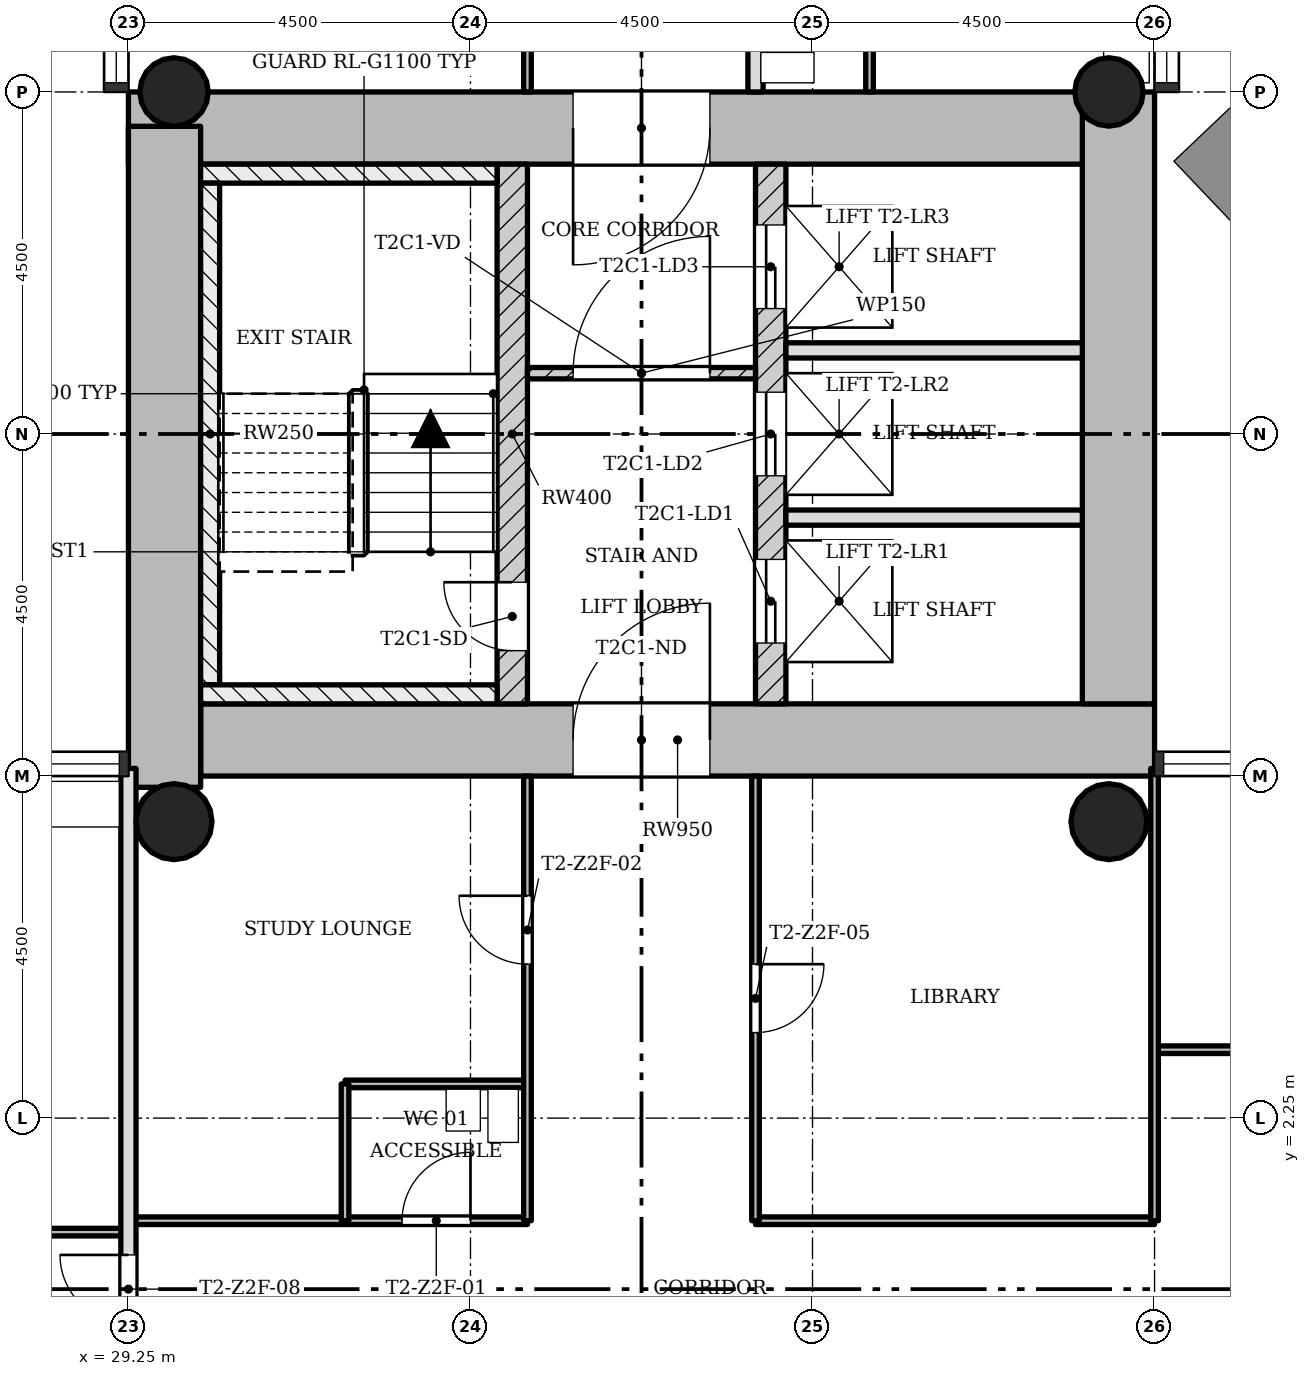
"""IFC4 building model, lengths in metres.
Left out: names, types, materials, properties, quantities, classifications, styles, units other than length and angle.
Written with IfcOpenShell. Run it as: python <this file> out.ifc"""

import sys

from ifc_helpers import new_model, si_unit, direction, frame, frame_2d, origin, origin_2d, place, context, subcontext, project, spatial, rectangle, hollow_circle, extrude, element, fill, save


model = new_model("IFC4")
c1 = context("Model", 3, precision=1e-05, world=origin(), true_north=direction((0.0, 1.0)))
c2 = subcontext(c1, "Body", "Model", "MODEL_VIEW")
j1 = project(units=[si_unit("LENGTHUNIT", "METRE"), si_unit("PLANEANGLEUNIT", "RADIAN")], contexts=[c1])
p1 = place(None, origin())
s1 = spatial("IfcSite", under=j1, at=p1, CompositionType="ELEMENT")
p2 = place(p1, origin())
s2 = spatial("IfcBuilding", under=s1, at=p2, CompositionType="ELEMENT")
p3 = place(p2, frame((0.0, 0.0, 114.0)))
s3 = spatial("IfcBuildingStorey", under=s2, at=p3, CompositionType="ELEMENT", Elevation=114.0)
p4 = place(p3, frame((30.2, 7.225, 0.0), z_axis=(0.0, 0.0, 1.0), x_axis=(1.0, 0.0, 0.0)))
e1 = element("IfcWall", 1, at=p4, inside=s3, PredefinedType="SHEAR", context=c2, shape_type="SweptSolid", body=[
    extrude(rectangle(XDim=12.55, YDim=0.95, at=frame_2d((6.275, 0.0))), origin(), (0.0, 0.0, 1.0), 3.4),
])
p5 = place(p4, frame((4.9, 0.0, 0.0)))
e2 = element("IfcOpeningElement", 2, at=p5, cuts=e1, PredefinedType="OPENING", context=c2, shape_type="SweptSolid", body=[
    extrude(rectangle(XDim=1.8, YDim=2.1, at=frame_2d((0.9, 1.05))), frame((0.0, 0.485, 0.0), z_axis=(0.0, -1.0, 0.0), x_axis=(1.0, 0.0, 0.0)), (0.0, 0.0, 1.0), 0.97),
])
p6 = place(p3, frame((42.275, 7.7, 0.0), z_axis=(0.0, 0.0, 1.0), x_axis=(0.0, 1.0, 0.0)))
e3 = element("IfcWall", 3, at=p6, inside=s3, PredefinedType="SHEAR", context=c2, shape_type="SweptSolid", body=[
    extrude(rectangle(XDim=8.05, YDim=0.95, at=frame_2d((4.025, 0.0))), origin(), (0.0, 0.0, 1.0), 3.4),
])
p7 = place(p3, frame((41.8, 15.275, 0.0), z_axis=(0.0, 0.0, 1.0), x_axis=(-1.0, 0.0, 0.0)))
e4 = element("IfcWall", 4, at=p7, inside=s3, PredefinedType="SHEAR", context=c2, shape_type="SweptSolid", body=[
    extrude(rectangle(XDim=12.55, YDim=0.95, at=frame_2d((6.275, 0.0))), origin(), (0.0, 0.0, 1.0), 3.4),
])
p8 = place(p7, frame((4.9, 0.0, 0.0)))
e5 = element("IfcOpeningElement", 5, at=p8, cuts=e4, PredefinedType="OPENING", context=c2, shape_type="SweptSolid", body=[
    extrude(rectangle(XDim=1.8, YDim=2.1, at=frame_2d((0.9, 1.05))), frame((0.0, 0.485, 0.0), z_axis=(0.0, -1.0, 0.0), x_axis=(1.0, 0.0, 0.0)), (0.0, 0.0, 1.0), 0.97),
])
p9 = place(p3, frame((29.725, 15.298, 0.0), z_axis=(0.0, 0.0, 1.0), x_axis=(0.0, -1.0, 0.0)))
e6 = element("IfcWall", 6, at=p9, inside=s3, PredefinedType="SHEAR", context=c2, shape_type="SweptSolid", body=[
    extrude(rectangle(XDim=8.696, YDim=0.95, at=frame_2d((4.348, 0.0))), origin(), (0.0, 0.0, 1.0), 3.4),
])
p10 = place(p3, frame((34.3, 7.7, 0.0), z_axis=(0.0, 0.0, 1.0), x_axis=(0.0, 1.0, 0.0)))
e7 = element("IfcWall", 7, at=p10, inside=s3, PredefinedType="SHEAR", context=c2, shape_type="SweptSolid", body=[
    extrude(rectangle(XDim=7.1, YDim=0.4, at=frame_2d((3.55, 0.0))), origin(), (0.0, 0.0, 1.0), 3.4),
])
p11 = place(p10, frame((0.7, 0.0, 0.0)))
e8 = element("IfcOpeningElement", 8, at=p11, cuts=e7, PredefinedType="OPENING", context=c2, shape_type="SweptSolid", body=[
    extrude(rectangle(XDim=0.9, YDim=2.1, at=frame_2d((0.45, 1.05))), frame((0.0, 0.21, 0.0), z_axis=(0.0, -1.0, 0.0), x_axis=(1.0, 0.0, 0.0)), (0.0, 0.0, 1.0), 0.42),
])
p12 = place(p3, frame((37.7, 7.7, 0.0), z_axis=(0.0, 0.0, 1.0), x_axis=(0.0, 1.0, 0.0)))
e9 = element("IfcWall", 9, at=p12, inside=s3, PredefinedType="SHEAR", context=c2, shape_type="SweptSolid", body=[
    extrude(rectangle(XDim=7.1, YDim=0.4, at=frame_2d((3.55, 0.0))), origin(), (0.0, 0.0, 1.0), 3.4),
])
p13 = place(p12, frame((0.8, 0.0, 0.0)))
e10 = element("IfcOpeningElement", 10, at=p13, cuts=e9, PredefinedType="OPENING", context=c2, shape_type="SweptSolid", body=[
    extrude(rectangle(XDim=1.1, YDim=2.1, at=frame_2d((0.55, 1.05))), frame((0.0, 0.21, 0.0), z_axis=(0.0, -1.0, 0.0), x_axis=(1.0, 0.0, 0.0)), (0.0, 0.0, 1.0), 0.42),
])
p14 = place(p12, frame((3.0, 0.0, 0.0)))
e11 = element("IfcOpeningElement", 11, at=p14, cuts=e9, PredefinedType="OPENING", context=c2, shape_type="SweptSolid", body=[
    extrude(rectangle(XDim=1.1, YDim=2.1, at=frame_2d((0.55, 1.05))), frame((0.0, 0.21, 0.0), z_axis=(0.0, -1.0, 0.0), x_axis=(1.0, 0.0, 0.0)), (0.0, 0.0, 1.0), 0.42),
])
p15 = place(p12, frame((5.2, 0.0, 0.0)))
e12 = element("IfcOpeningElement", 12, at=p15, cuts=e9, PredefinedType="OPENING", context=c2, shape_type="SweptSolid", body=[
    extrude(rectangle(XDim=1.1, YDim=2.1, at=frame_2d((0.55, 1.05))), frame((0.0, 0.21, 0.0), z_axis=(0.0, -1.0, 0.0), x_axis=(1.0, 0.0, 0.0)), (0.0, 0.0, 1.0), 0.42),
])
for number, where, z_axis, x_axis in (
    (13, (42.15, 15.75, 0.0), (0.0, 0.0, 1.0), (1.0, 0.0, 0.0)),
    (14, (29.85, 15.75, 0.0), (0.0, 0.0, 1.0), (1.0, 0.0, 0.0)),
):
    element("IfcColumn", number, at=place(p3, frame(where, z_axis=z_axis, x_axis=x_axis)), inside=s3, PredefinedType="COLUMN", context=c2, shape_type="SweptSolid", body=[
        extrude(hollow_circle(Radius=0.45, WallThickness=0.032, at=origin_2d()), origin(), (0.0, 0.0, 1.0), 3.4),
    ])
for number, where, z_axis, x_axis in (
    (15, (42.15, 6.15, 0.0), (0.0, 0.0, 1.0), (1.0, 0.0, 0.0)),
    (16, (29.85, 6.15, 0.0), (0.0, 0.0, 1.0), (1.0, 0.0, 0.0)),
):
    element("IfcColumn", number, at=place(p3, frame(where, z_axis=z_axis, x_axis=x_axis)), inside=s3, PredefinedType="COLUMN", context=c2, shape_type="SweptSolid", body=[
        extrude(hollow_circle(Radius=0.5, WallThickness=0.036, at=origin_2d()), origin(), (0.0, 0.0, 1.0), 3.4),
    ])
p16 = place(p3, frame((37.5, 12.05, 0.0), z_axis=(0.0, 0.0, 1.0), x_axis=(-1.0, 0.0, 0.0)))
e17 = element("IfcWall", 17, at=p16, inside=s3, PredefinedType="PARTITIONING", context=c2, shape_type="SweptSolid", body=[
    extrude(rectangle(XDim=3.0, YDim=0.15, at=frame_2d((1.5, 0.0))), origin(), (0.0, 0.0, 1.0), 3.0),
])
p17 = place(p16, frame((0.6, 0.0, 0.0)))
e18 = element("IfcOpeningElement", 18, at=p17, cuts=e17, PredefinedType="OPENING", context=c2, shape_type="SweptSolid", body=[
    extrude(rectangle(XDim=1.8, YDim=2.1, at=frame_2d((0.9, 1.05))), frame((0.0, 0.085, 0.0), z_axis=(0.0, -1.0, 0.0), x_axis=(1.0, 0.0, 0.0)), (0.0, 0.0, 1.0), 0.17),
])
for number, where, z_axis, x_axis in (
    (19, (41.8, 10.15, 0.0), (0.0, 0.0, 1.0), (-1.0, 0.0, 0.0)),
    (20, (41.8, 12.35, 0.0), (0.0, 0.0, 1.0), (-1.0, 0.0, 0.0)),
):
    element("IfcWall", number, at=place(p3, frame(where, z_axis=z_axis, x_axis=x_axis)), inside=s3, PredefinedType="SOLIDWALL", context=c2, shape_type="SweptSolid", body=[
        extrude(rectangle(XDim=3.9, YDim=0.2, at=frame_2d((1.95, 0.0))), origin(), (0.0, 0.0, 1.0), 3.0),
    ])
p18 = place(p3, frame((29.25, 0.75, 0.0), z_axis=(0.0, 0.0, 1.0), x_axis=(-1.0, 0.0, 0.0)))
e21 = element("IfcWall", 21, at=p18, inside=s3, PredefinedType="PARTITIONING", context=c2, shape_type="SweptSolid", body=[
    extrude(rectangle(XDim=7.8, YDim=0.1, at=frame_2d((3.9, 0.0))), origin(), (0.0, 0.0, 1.0), 3.0),
])
p19 = place(p18, frame((1.8, 0.0, 0.0)))
e22 = element("IfcOpeningElement", 22, at=p19, cuts=e21, PredefinedType="OPENING", context=c2, shape_type="SweptSolid", body=[
    extrude(rectangle(XDim=0.9, YDim=2.1, at=frame_2d((0.45, 1.05))), frame((0.0, 0.06, 0.0), z_axis=(0.0, -1.0, 0.0), x_axis=(1.0, 0.0, 0.0)), (0.0, 0.0, 1.0), 0.12),
])
p20 = place(p18, frame((4.95, 0.0, 0.0)))
e23 = element("IfcOpeningElement", 23, at=p20, cuts=e21, PredefinedType="OPENING", context=c2, shape_type="SweptSolid", body=[
    extrude(rectangle(XDim=0.9, YDim=2.1, at=frame_2d((0.45, 1.05))), frame((0.0, 0.06, 0.0), z_axis=(0.0, -1.0, 0.0), x_axis=(1.0, 0.0, 0.0)), (0.0, 0.0, 1.0), 0.12),
])
p21 = place(p18, frame((6.6, 0.0, 0.0)))
e24 = element("IfcOpeningElement", 24, at=p21, cuts=e21, PredefinedType="OPENING", context=c2, shape_type="SweptSolid", body=[
    extrude(rectangle(XDim=0.9, YDim=2.1, at=frame_2d((0.45, 1.05))), frame((0.0, 0.06, 0.0), z_axis=(0.0, -1.0, 0.0), x_axis=(1.0, 0.0, 0.0)), (0.0, 0.0, 1.0), 0.12),
])
p22 = place(p3, frame((42.75, 0.9, 0.0), z_axis=(0.0, 0.0, 1.0), x_axis=(-1.0, 0.0, 0.0)))
e25 = element("IfcWall", 25, at=p22, inside=s3, PredefinedType="PARTITIONING", context=c2, shape_type="SweptSolid", body=[
    extrude(rectangle(XDim=5.25, YDim=0.1, at=frame_2d((2.625, 0.0))), origin(), (0.0, 0.0, 1.0), 3.0),
])
p23 = place(p3, frame((34.5, 0.9, 0.0), z_axis=(0.0, 0.0, 1.0), x_axis=(-1.0, 0.0, 0.0)))
e26 = element("IfcWall", 26, at=p23, inside=s3, PredefinedType="PARTITIONING", context=c2, shape_type="SweptSolid", body=[
    extrude(rectangle(XDim=5.25, YDim=0.1, at=frame_2d((2.625, 0.0))), origin(), (0.0, 0.0, 1.0), 3.0),
])
p24 = place(p23, frame((0.75, 0.0, 0.0)))
e27 = element("IfcOpeningElement", 27, at=p24, cuts=e26, PredefinedType="OPENING", context=c2, shape_type="SweptSolid", body=[
    extrude(rectangle(XDim=0.9, YDim=2.1, at=frame_2d((0.45, 1.05))), frame((0.0, 0.06, 0.0), z_axis=(0.0, -1.0, 0.0), x_axis=(1.0, 0.0, 0.0)), (0.0, 0.0, 1.0), 0.12),
])
p25 = place(p3, frame((34.5, 2.7, 0.0), z_axis=(0.0, 0.0, 1.0), x_axis=(-1.0, 0.0, 0.0)))
e28 = element("IfcWall", 28, at=p25, inside=s3, PredefinedType="PARTITIONING", context=c2, shape_type="SweptSolid", body=[
    extrude(rectangle(XDim=2.4, YDim=0.1, at=frame_2d((1.2, 0.0))), origin(), (0.0, 0.0, 1.0), 3.0),
])
p26 = place(p3, frame((51.75, 3.15, 0.0), z_axis=(0.0, 0.0, 1.0), x_axis=(-1.0, 0.0, 0.0)))
e29 = element("IfcWall", 29, at=p26, inside=s3, PredefinedType="PARTITIONING", context=c2, shape_type="SweptSolid", body=[
    extrude(rectangle(XDim=9.0, YDim=0.1, at=frame_2d((4.5, 0.0))), origin(), (0.0, 0.0, 1.0), 3.0),
])
p27 = place(p26, frame((5.55, 0.0, 0.0)))
e30 = element("IfcOpeningElement", 30, at=p27, cuts=e29, PredefinedType="OPENING", context=c2, shape_type="SweptSolid", body=[
    extrude(rectangle(XDim=0.9, YDim=2.1, at=frame_2d((0.45, 1.05))), frame((0.0, 0.06, 0.0), z_axis=(0.0, -1.0, 0.0), x_axis=(1.0, 0.0, 0.0)), (0.0, 0.0, 1.0), 0.12),
])
p28 = place(p3, frame((42.75, 0.9, 0.0), z_axis=(0.0, 0.0, 1.0), x_axis=(0.0, 1.0, 0.0)))
e31 = element("IfcWall", 31, at=p28, inside=s3, PredefinedType="PARTITIONING", context=c2, shape_type="SweptSolid", body=[
    extrude(rectangle(XDim=5.95, YDim=0.1, at=frame_2d((2.975, 0.0))), origin(), (0.0, 0.0, 1.0), 3.0),
])
p29 = place(p3, frame((39.0, 15.75, 0.0), z_axis=(0.0, 0.0, 1.0), x_axis=(0.0, 1.0, 0.0)))
e32 = element("IfcWall", 32, at=p29, inside=s3, PredefinedType="PARTITIONING", context=c2, shape_type="SweptSolid", body=[
    extrude(rectangle(XDim=2.4, YDim=0.1, at=frame_2d((1.2, 0.0))), origin(), (0.0, 0.0, 1.0), 3.0),
])
p30 = place(p29, frame((0.75, 0.0, 0.0)))
e33 = element("IfcOpeningElement", 33, at=p30, cuts=e32, PredefinedType="OPENING", context=c2, shape_type="SweptSolid", body=[
    extrude(rectangle(XDim=0.9, YDim=2.1, at=frame_2d((0.45, 1.05))), frame((0.0, 0.06, 0.0), z_axis=(0.0, -1.0, 0.0), x_axis=(1.0, 0.0, 0.0)), (0.0, 0.0, 1.0), 0.12),
])
p31 = place(p3, frame((37.5, 0.9, 0.0), z_axis=(0.0, 0.0, 1.0), x_axis=(0.0, 1.0, 0.0)))
e34 = element("IfcWall", 34, at=p31, inside=s3, PredefinedType="PARTITIONING", context=c2, shape_type="SweptSolid", body=[
    extrude(rectangle(XDim=5.85, YDim=0.1, at=frame_2d((2.925, 0.0))), origin(), (0.0, 0.0, 1.0), 3.0),
])
p32 = place(p31, frame((2.475, 0.0, 0.0)))
e35 = element("IfcOpeningElement", 35, at=p32, cuts=e34, PredefinedType="OPENING", context=c2, shape_type="SweptSolid", body=[
    extrude(rectangle(XDim=0.9, YDim=2.1, at=frame_2d((0.45, 1.05))), frame((0.0, 0.06, 0.0), z_axis=(0.0, -1.0, 0.0), x_axis=(1.0, 0.0, 0.0)), (0.0, 0.0, 1.0), 0.12),
])
p33 = place(p3, frame((37.5, 15.75, 0.0), z_axis=(0.0, 0.0, 1.0), x_axis=(0.0, 1.0, 0.0)))
e36 = element("IfcWall", 36, at=p33, inside=s3, PredefinedType="SOLIDWALL", context=c2, shape_type="SweptSolid", body=[
    extrude(rectangle(XDim=4.5, YDim=0.2, at=frame_2d((2.25, 0.0))), origin(), (0.0, 0.0, 1.0), 3.0),
])
p34 = place(p33, frame((3.0, 0.0, 0.0)))
e37 = element("IfcOpeningElement", 37, at=p34, cuts=e36, PredefinedType="OPENING", context=c2, shape_type="SweptSolid", body=[
    extrude(rectangle(XDim=0.9, YDim=2.1, at=frame_2d((0.45, 1.05))), frame((0.0, 0.11, 0.0), z_axis=(0.0, -1.0, 0.0), x_axis=(1.0, 0.0, 0.0)), (0.0, 0.0, 1.0), 0.22),
])
p35 = place(p3, frame((34.5, 0.9, 0.0), z_axis=(0.0, 0.0, 1.0), x_axis=(0.0, 1.0, 0.0)))
e38 = element("IfcWall", 38, at=p35, inside=s3, PredefinedType="PARTITIONING", context=c2, shape_type="SweptSolid", body=[
    extrude(rectangle(XDim=5.85, YDim=0.1, at=frame_2d((2.925, 0.0))), origin(), (0.0, 0.0, 1.0), 3.0),
])
p36 = place(p35, frame((3.375, 0.0, 0.0)))
e39 = element("IfcOpeningElement", 39, at=p36, cuts=e38, PredefinedType="OPENING", context=c2, shape_type="SweptSolid", body=[
    extrude(rectangle(XDim=0.9, YDim=2.1, at=frame_2d((0.45, 1.05))), frame((0.0, 0.06, 0.0), z_axis=(0.0, -1.0, 0.0), x_axis=(1.0, 0.0, 0.0)), (0.0, 0.0, 1.0), 0.12),
])
p37 = place(p3, frame((34.5, 15.75, 0.0), z_axis=(0.0, 0.0, 1.0), x_axis=(0.0, 1.0, 0.0)))
e40 = element("IfcWall", 40, at=p37, inside=s3, PredefinedType="PARTITIONING", context=c2, shape_type="SweptSolid", body=[
    extrude(rectangle(XDim=4.5, YDim=0.1, at=frame_2d((2.25, 0.0))), origin(), (0.0, 0.0, 1.0), 3.0),
])
p38 = place(p37, frame((1.8, 0.0, 0.0)))
e41 = element("IfcOpeningElement", 41, at=p38, cuts=e40, PredefinedType="OPENING", context=c2, shape_type="SweptSolid", body=[
    extrude(rectangle(XDim=0.9, YDim=2.1, at=frame_2d((0.45, 1.05))), frame((0.0, 0.06, 0.0), z_axis=(0.0, -1.0, 0.0), x_axis=(1.0, 0.0, 0.0)), (0.0, 0.0, 1.0), 0.12),
])
p39 = place(p3, frame((32.1, 0.9, 0.0), z_axis=(0.0, 0.0, 1.0), x_axis=(0.0, 1.0, 0.0)))
e42 = element("IfcWall", 42, at=p39, inside=s3, PredefinedType="PARTITIONING", context=c2, shape_type="SweptSolid", body=[
    extrude(rectangle(XDim=1.8, YDim=0.1, at=frame_2d((0.9, 0.0))), origin(), (0.0, 0.0, 1.0), 3.0),
])
p40 = place(p3, frame((29.25, -6.85, 0.0), z_axis=(0.0, 0.0, 1.0), x_axis=(0.0, 1.0, 0.0)))
e43 = element("IfcWall", 43, at=p40, inside=s3, PredefinedType="SOLIDWALL", context=c2, shape_type="SweptSolid", body=[
    extrude(rectangle(XDim=13.7, YDim=0.2, at=frame_2d((6.85, 0.0))), origin(), (0.0, 0.0, 1.0), 3.0),
])
p41 = place(p40, frame((6.4, 0.0, 0.0)))
e44 = element("IfcOpeningElement", 44, at=p41, cuts=e43, PredefinedType="OPENING", context=c2, shape_type="SweptSolid", body=[
    extrude(rectangle(XDim=0.9, YDim=2.1, at=frame_2d((0.45, 1.05))), frame((0.0, 0.11, 0.0), z_axis=(0.0, -1.0, 0.0), x_axis=(1.0, 0.0, 0.0)), (0.0, 0.0, 1.0), 0.22),
])
p42 = place(p3, frame((34.1, 14.675, 0.0), z_axis=(0.0, 0.0, 1.0), x_axis=(-1.0, 0.0, 0.0)))
e45 = element("IfcWall", 45, at=p42, inside=s3, PredefinedType="SHEAR", context=c2, shape_type="SweptSolid", body=[
    extrude(rectangle(XDim=3.9, YDim=0.25, at=frame_2d((1.95, 0.0))), origin(), (0.0, 0.0, 1.0), 3.4),
])
p43 = place(p3, frame((30.325, 7.95, 0.0), z_axis=(0.0, 0.0, 1.0), x_axis=(0.0, 1.0, 0.0)))
e46 = element("IfcWall", 46, at=p43, inside=s3, PredefinedType="SHEAR", context=c2, shape_type="SweptSolid", body=[
    extrude(rectangle(XDim=6.6, YDim=0.25, at=frame_2d((3.3, 0.0))), origin(), (0.0, 0.0, 1.0), 3.4),
])
p44 = place(p3, frame((34.1, 7.825, 0.0), z_axis=(0.0, 0.0, 1.0), x_axis=(-1.0, 0.0, 0.0)))
e47 = element("IfcWall", 47, at=p44, inside=s3, PredefinedType="SHEAR", context=c2, shape_type="SweptSolid", body=[
    extrude(rectangle(XDim=3.9, YDim=0.25, at=frame_2d((1.95, 0.0))), origin(), (0.0, 0.0, 1.0), 3.4),
])
p45 = place(p17, origin())
e48 = element("IfcDoor", 48, at=p45, inside=s3, OperationType="SINGLE_SWING_LEFT", PredefinedType="DOOR", context=c2, shape_type="SweptSolid", body=[
    extrude(rectangle(XDim=1.8, YDim=2.1, at=frame_2d((0.9, 1.05))), frame((0.0, 0.025, 0.0), z_axis=(0.0, -1.0, 0.0), x_axis=(1.0, 0.0, 0.0)), (0.0, 0.0, 1.0), 0.05),
])
fill(e18, e48)
p46 = place(p24, origin())
e49 = element("IfcDoor", 49, at=p46, inside=s3, OperationType="SINGLE_SWING_LEFT", PredefinedType="DOOR", context=c2, shape_type="SweptSolid", body=[
    extrude(rectangle(XDim=0.9, YDim=2.1, at=frame_2d((0.45, 1.05))), frame((0.0, 0.025, 0.0), z_axis=(0.0, -1.0, 0.0), x_axis=(1.0, 0.0, 0.0)), (0.0, 0.0, 1.0), 0.05),
])
fill(e27, e49)
p47 = place(p36, origin())
e50 = element("IfcDoor", 50, at=p47, inside=s3, OperationType="SINGLE_SWING_LEFT", PredefinedType="DOOR", context=c2, shape_type="SweptSolid", body=[
    extrude(rectangle(XDim=0.9, YDim=2.1, at=frame_2d((0.45, 1.05))), frame((0.0, 0.025, 0.0), z_axis=(0.0, -1.0, 0.0), x_axis=(1.0, 0.0, 0.0)), (0.0, 0.0, 1.0), 0.05),
])
fill(e39, e50)
p48 = place(p32, origin())
e51 = element("IfcDoor", 51, at=p48, inside=s3, OperationType="SINGLE_SWING_RIGHT", PredefinedType="DOOR", context=c2, shape_type="SweptSolid", body=[
    extrude(rectangle(XDim=0.9, YDim=2.1, at=frame_2d((0.45, 1.05))), frame((0.0, 0.025, 0.0), z_axis=(0.0, -1.0, 0.0), x_axis=(1.0, 0.0, 0.0)), (0.0, 0.0, 1.0), 0.05),
])
fill(e35, e51)
p49 = place(p41, origin())
e52 = element("IfcDoor", 52, at=p49, inside=s3, OperationType="SINGLE_SWING_LEFT", PredefinedType="DOOR", context=c2, shape_type="SweptSolid", body=[
    extrude(rectangle(XDim=0.9, YDim=2.1, at=frame_2d((0.45, 1.05))), frame((0.0, 0.025, 0.0), z_axis=(0.0, -1.0, 0.0), x_axis=(1.0, 0.0, 0.0)), (0.0, 0.0, 1.0), 0.05),
])
fill(e44, e52)
p50 = place(p11, origin())
e53 = element("IfcDoor", 53, at=p50, inside=s3, OperationType="SINGLE_SWING_LEFT", PredefinedType="DOOR", context=c2, shape_type="SweptSolid", body=[
    extrude(rectangle(XDim=0.9, YDim=2.1, at=frame_2d((0.45, 1.05))), frame((0.0, 0.025, 0.0), z_axis=(0.0, -1.0, 0.0), x_axis=(1.0, 0.0, 0.0)), (0.0, 0.0, 1.0), 0.05),
])
fill(e8, e53)
p51 = place(p13, origin())
e54 = element("IfcDoor", 54, at=p51, inside=s3, OperationType="SLIDING_TO_LEFT", PredefinedType="DOOR", context=c2, shape_type="SweptSolid", body=[
    extrude(rectangle(XDim=1.1, YDim=2.1, at=frame_2d((0.55, 1.05))), frame((0.0, 0.025, 0.0), z_axis=(0.0, -1.0, 0.0), x_axis=(1.0, 0.0, 0.0)), (0.0, 0.0, 1.0), 0.05),
])
fill(e10, e54)
p52 = place(p14, origin())
e55 = element("IfcDoor", 55, at=p52, inside=s3, OperationType="SLIDING_TO_LEFT", PredefinedType="DOOR", context=c2, shape_type="SweptSolid", body=[
    extrude(rectangle(XDim=1.1, YDim=2.1, at=frame_2d((0.55, 1.05))), frame((0.0, 0.025, 0.0), z_axis=(0.0, -1.0, 0.0), x_axis=(1.0, 0.0, 0.0)), (0.0, 0.0, 1.0), 0.05),
])
fill(e11, e55)
p53 = place(p15, origin())
e56 = element("IfcDoor", 56, at=p53, inside=s3, OperationType="SLIDING_TO_LEFT", PredefinedType="DOOR", context=c2, shape_type="SweptSolid", body=[
    extrude(rectangle(XDim=1.1, YDim=2.1, at=frame_2d((0.55, 1.05))), frame((0.0, 0.025, 0.0), z_axis=(0.0, -1.0, 0.0), x_axis=(1.0, 0.0, 0.0)), (0.0, 0.0, 1.0), 0.05),
])
fill(e12, e56)
p54 = place(p5, origin())
e57 = element("IfcDoor", 57, at=p54, inside=s3, OperationType="SINGLE_SWING_LEFT", PredefinedType="DOOR", context=c2, shape_type="SweptSolid", body=[
    extrude(rectangle(XDim=1.8, YDim=2.1, at=frame_2d((0.9, 1.05))), frame((0.0, 0.025, 0.0), z_axis=(0.0, -1.0, 0.0), x_axis=(1.0, 0.0, 0.0)), (0.0, 0.0, 1.0), 0.05),
])
fill(e2, e57)
p55 = place(p8, origin())
e58 = element("IfcDoor", 58, at=p55, inside=s3, OperationType="SINGLE_SWING_LEFT", PredefinedType="DOOR", context=c2, shape_type="SweptSolid", body=[
    extrude(rectangle(XDim=1.8, YDim=2.1, at=frame_2d((0.9, 1.05))), frame((0.0, 0.025, 0.0), z_axis=(0.0, -1.0, 0.0), x_axis=(1.0, 0.0, 0.0)), (0.0, 0.0, 1.0), 0.05),
])
fill(e5, e58)
save(model, sys.argv[1])
